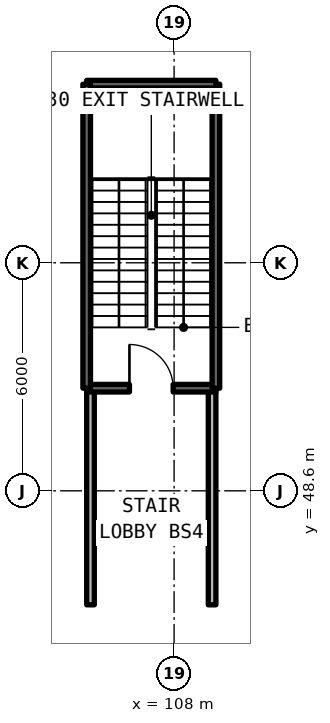
"""IFC4 building model, lengths in metres.
Left out: names, types, materials, properties, quantities, classifications, styles, units other than length and angle.
Written with IfcOpenShell. Run it as: python <this file> out.ifc"""

import sys

from ifc_helpers import new_model, si_unit, direction, frame, frame_2d, origin, place, context, subcontext, project, spatial, rectangle, extrude, element, fill, save


model = new_model("IFC4")
c1 = context("Model", 3, precision=1e-05, world=origin(), true_north=direction((0.0, 1.0)))
c2 = subcontext(c1, "Body", "Model", "MODEL_VIEW")
j1 = project(units=[si_unit("LENGTHUNIT", "METRE"), si_unit("PLANEANGLEUNIT", "RADIAN")], contexts=[c1])
p1 = place(None, origin())
s1 = spatial("IfcSite", under=j1, at=p1, CompositionType="ELEMENT")
p2 = place(p1, origin())
s2 = spatial("IfcBuilding", under=s1, at=p2, CompositionType="ELEMENT")
p3 = place(p2, frame((0.0, 0.0, -9.24)))
s3 = spatial("IfcBuildingStorey", under=s2, at=p3, CompositionType="ELEMENT", Elevation=-9.24)
for number, where, z_axis, x_axis in (
    (1, (105.8, 45.6, 0.0), (0.0, 0.0, 1.0), (0.0, 1.0, 0.0)),
    (2, (109.0, 45.6, 0.0), (0.0, 0.0, 1.0), (0.0, 1.0, 0.0)),
):
    element("IfcWall", number, at=place(p3, frame(where, z_axis=z_axis, x_axis=x_axis)), inside=s3, PredefinedType="SOLIDWALL", context=c2, shape_type="SweptSolid", body=[
        extrude(rectangle(XDim=5.7, YDim=0.2, at=frame_2d((2.85, 0.0))), origin(), (0.0, 0.0, 1.0), 3.54),
    ])
p4 = place(p3, frame((105.7, 51.3, 0.0), z_axis=(0.0, 0.0, 1.0), x_axis=(1.0, 0.0, 0.0)))
e3 = element("IfcWall", 3, at=p4, inside=s3, PredefinedType="SOLIDWALL", context=c2, shape_type="SweptSolid", body=[
    extrude(rectangle(XDim=3.4, YDim=0.2, at=frame_2d((1.7, 0.0))), origin(), (0.0, 0.0, 1.0), 4.62),
])
p5 = place(p4, frame((1.125, 0.0, 0.0)))
e4 = element("IfcOpeningElement", 4, at=p5, cuts=e3, PredefinedType="OPENING", context=c2, shape_type="SweptSolid", body=[
    extrude(rectangle(XDim=1.15, YDim=2.15, at=frame_2d((0.575, 1.075))), frame((0.0, 0.11, 0.0), z_axis=(0.0, -1.0, 0.0), x_axis=(1.0, 0.0, 0.0)), (0.0, 0.0, 1.0), 0.22),
])
p6 = place(p3, frame((109.1, 51.3, 0.0), z_axis=(0.0, 0.0, 1.0), x_axis=(0.0, 1.0, 0.0)))
e5 = element("IfcWall", 5, at=p6, inside=s3, PredefinedType="SOLIDWALL", context=c2, shape_type="SweptSolid", body=[
    extrude(rectangle(XDim=8.0, YDim=0.2, at=frame_2d((4.0, 0.0))), origin(), (0.0, 0.0, 1.0), 4.62),
])
p7 = place(p3, frame((109.1, 59.3, 0.0), z_axis=(0.0, 0.0, 1.0), x_axis=(-1.0, 0.0, 0.0)))
e6 = element("IfcWall", 6, at=p7, inside=s3, PredefinedType="SOLIDWALL", context=c2, shape_type="SweptSolid", body=[
    extrude(rectangle(XDim=3.4, YDim=0.2, at=frame_2d((1.7, 0.0))), origin(), (0.0, 0.0, 1.0), 4.62),
])
p8 = place(p3, frame((105.7, 59.3, 0.0), z_axis=(0.0, 0.0, 1.0), x_axis=(0.0, -1.0, 0.0)))
e7 = element("IfcWall", 7, at=p8, inside=s3, PredefinedType="SOLIDWALL", context=c2, shape_type="SweptSolid", body=[
    extrude(rectangle(XDim=8.0, YDim=0.2, at=frame_2d((4.0, 0.0))), origin(), (0.0, 0.0, 1.0), 4.62),
])
p9 = place(p5, origin())
e8 = element("IfcDoor", 8, at=p9, inside=s3, OperationType="SINGLE_SWING_RIGHT", PredefinedType="DOOR", context=c2, shape_type="SweptSolid", body=[
    extrude(rectangle(XDim=1.15, YDim=2.15, at=frame_2d((0.575, 1.075))), frame((0.0, 0.025, 0.0), z_axis=(0.0, -1.0, 0.0), x_axis=(1.0, 0.0, 0.0)), (0.0, 0.0, 1.0), 0.05),
])
fill(e4, e8)
save(model, sys.argv[1])
